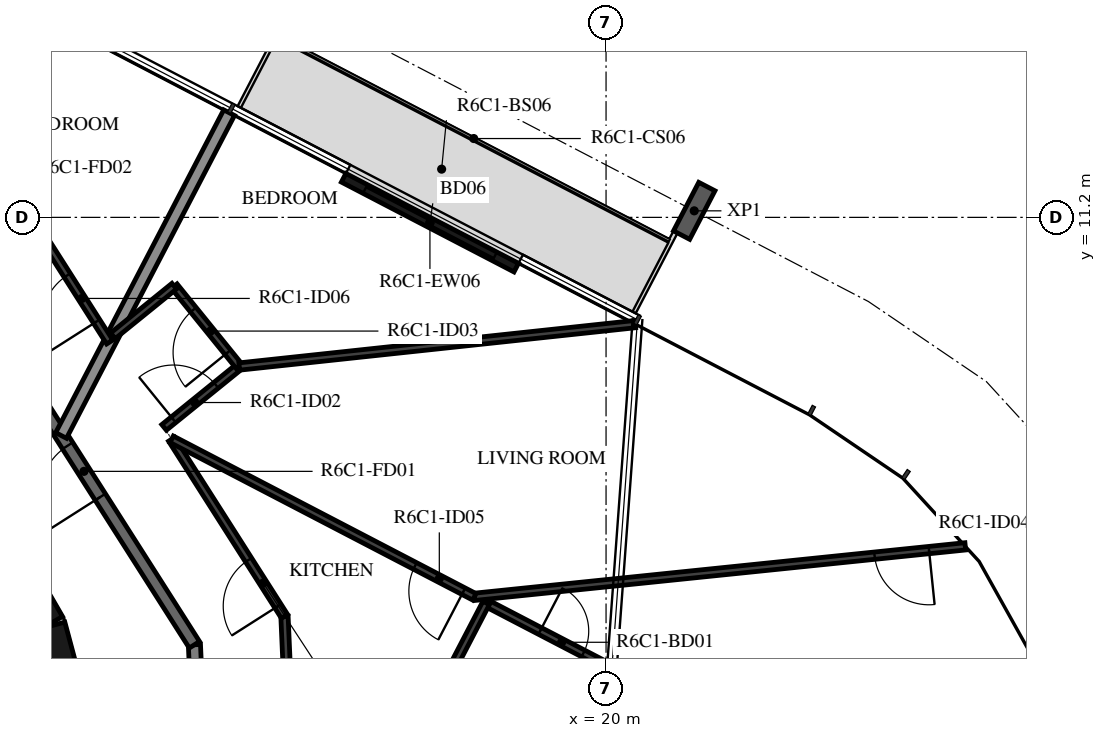
"""IFC4 building model, lengths in metres.
Left out: names, types, materials, properties, quantities, classifications, styles, units other than length and angle.
Written with IfcOpenShell. Run it as: python <this file> out.ifc"""

import sys

from ifc_helpers import new_model, si_unit, direction, frame, frame_2d, origin, origin_2d, place, context, subcontext, project, spatial, rectangle, i_section, extrude, element, fill, save


model = new_model("IFC4")
c1 = context("Model", 3, precision=1e-05, world=origin(), true_north=direction((0.0, 1.0)))
c2 = subcontext(c1, "Body", "Model", "MODEL_VIEW")
j1 = project(units=[si_unit("LENGTHUNIT", "METRE"), si_unit("PLANEANGLEUNIT", "RADIAN")], contexts=[c1])
p1 = place(None, origin())
s1 = spatial("IfcSite", under=j1, at=p1, CompositionType="ELEMENT")
p2 = place(p1, origin())
s2 = spatial("IfcBuilding", under=s1, at=p2, CompositionType="ELEMENT")
p3 = place(p2, frame((0.0, 0.0, 251.2)))
s3 = spatial("IfcBuildingStorey", under=s2, at=p3, CompositionType="ELEMENT", Elevation=251.2)
p4 = place(p3, frame((21.45, 11.308, -0.38), z_axis=(0.0, 0.0, 1.0), x_axis=(0.887010710334, -0.461748849216, 0.0)))
e1 = element("IfcColumn", 1, at=p4, inside=s3, PredefinedType="COLUMN", context=c2, shape_type="SweptSolid", body=[
    extrude(i_section(OverallWidth=0.3, OverallDepth=0.9, WebThickness=0.019, FlangeThickness=0.035, FilletRadius=0.03, at=origin_2d()), origin(), (0.0, 0.0, 1.0), 3.5),
])
p5 = place(p3, frame((18.523, 10.374, 0.0), z_axis=(0.0, 0.0, 1.0), x_axis=(-0.887014349583, 0.461741858221, 0.0)))
e2 = element("IfcWall", 2, at=p5, inside=s3, PredefinedType="STANDARD", context=c2, shape_type="SweptSolid", body=[
    extrude(rectangle(XDim=3.2, YDim=0.16, at=frame_2d((1.6, 0.0))), origin(), (0.0, 0.0, 1.0), 3.12),
])
p6 = place(p5, frame((0.4, 0.0, 0.0)))
e3 = element("IfcOpeningElement", 3, at=p6, cuts=e2, PredefinedType="OPENING", context=c2, shape_type="SweptSolid", body=[
    extrude(rectangle(XDim=2.4, YDim=2.4, at=frame_2d((1.2, 1.2))), frame((0.0, 0.09, 0.0), z_axis=(0.0, -1.0, 0.0), x_axis=(1.0, 0.0, 0.0)), (0.0, 0.0, 1.0), 0.18),
])
for number, where, z_axis, x_axis in (
    (4, (11.643, 1.55, 0.0), (0.0, 0.0, 1.0), (-0.259, 0.966, 0.0)),
    (5, (10.845, 4.51, 0.0), (0.0, 0.0, 1.0), (-0.5, 0.866, 0.0)),
):
    element("IfcWall", number, at=place(p3, frame(where, z_axis=z_axis, x_axis=x_axis)), inside=s3, PredefinedType="SHEAR", context=c2, shape_type="SweptSolid", body=[
        extrude(rectangle(XDim=3.033, YDim=0.5, at=frame_2d((1.516, 0.0))), origin(), (0.0, 0.0, 1.0), 3.12),
    ])
p7 = place(p3, frame((13.331, 1.874, 0.0), z_axis=(0.0, 0.0, 1.0), x_axis=(-0.043621457762, 0.999048131184, 0.0)))
e6 = element("IfcWall", 6, at=p7, inside=s3, PredefinedType="STANDARD", context=c2, shape_type="SweptSolid", body=[
    extrude(rectangle(XDim=2.3, YDim=0.2, at=frame_2d((1.15, 0.0))), origin(), (0.0, 0.0, 1.0), 3.12),
])
p8 = place(p3, frame((13.231, 4.172, 0.0), z_axis=(0.0, 0.0, 1.0), x_axis=(-0.537304397561, 0.843388394728, 0.0)))
e7 = element("IfcWall", 7, at=p8, inside=s3, PredefinedType="STANDARD", context=c2, shape_type="SweptSolid", body=[
    extrude(rectangle(XDim=7.181, YDim=0.2, at=frame_2d((3.59, 0.0))), origin(), (0.0, 0.0, 1.0), 3.12),
])
p9 = place(p8, frame((2.881, 0.0, 0.0)))
e8 = element("IfcOpeningElement", 8, at=p9, cuts=e7, PredefinedType="OPENING", context=c2, shape_type="SweptSolid", body=[
    extrude(rectangle(XDim=1.0, YDim=2.1, at=frame_2d((0.5, 1.05))), frame((0.0, 0.11, 0.0), z_axis=(0.0, -1.0, 0.0), x_axis=(1.0, 0.0, 0.0)), (0.0, 0.0, 1.0), 0.22),
])
p10 = place(p8, frame((5.681, 0.0, 0.0)))
e9 = element("IfcOpeningElement", 9, at=p10, cuts=e7, PredefinedType="OPENING", context=c2, shape_type="SweptSolid", body=[
    extrude(rectangle(XDim=1.0, YDim=2.1, at=frame_2d((0.5, 1.05))), frame((0.0, 0.11, 0.0), z_axis=(0.0, -1.0, 0.0), x_axis=(1.0, 0.0, 0.0)), (0.0, 0.0, 1.0), 0.22),
])
p11 = place(p3, frame((13.801, 12.922, 0.0), z_axis=(0.0, 0.0, 1.0), x_axis=(-0.461726485624, -0.887022351733, 0.0)))
e10 = element("IfcWall", 10, at=p11, inside=s3, PredefinedType="STANDARD", context=c2, shape_type="SweptSolid", body=[
    extrude(rectangle(XDim=5.984, YDim=0.2, at=frame_2d((2.992, 0.0))), origin(), (0.0, 0.0, 1.0), 2.73),
])
p12 = place(p3, frame((14.761, 3.5, 0.0), z_axis=(0.0, 0.0, 1.0), x_axis=(-0.04369750018, 0.999044808043, 0.0)))
e11 = element("IfcWall", 11, at=p12, inside=s3, PredefinedType="PARTITIONING", context=c2, shape_type="SweptSolid", body=[
    extrude(rectangle(XDim=1.14, YDim=0.12, at=frame_2d((0.57, 0.0))), origin(), (0.0, 0.0, 1.0), 3.12),
])
p13 = place(p3, frame((14.712, 4.639, 0.0), z_axis=(0.0, 0.0, 1.0), x_axis=(-0.537287126609, 0.843399397427, 0.0)))
e12 = element("IfcWall", 12, at=p13, inside=s3, PredefinedType="PARTITIONING", context=c2, shape_type="SweptSolid", body=[
    extrude(rectangle(XDim=3.453, YDim=0.12, at=frame_2d((1.727, 0.0))), origin(), (0.0, 0.0, 1.0), 3.12),
])
p14 = place(p13, frame((0.2, 0.0, 0.0)))
e13 = element("IfcOpeningElement", 13, at=p14, cuts=e12, PredefinedType="OPENING", context=c2, shape_type="SweptSolid", body=[
    extrude(rectangle(XDim=0.9, YDim=2.1, at=frame_2d((0.45, 1.05))), frame((0.0, 0.07, 0.0), z_axis=(0.0, -1.0, 0.0), x_axis=(1.0, 0.0, 0.0)), (0.0, 0.0, 1.0), 0.14),
])
p15 = place(p3, frame((12.732, 7.746, 0.0), z_axis=(0.0, 0.0, 1.0), x_axis=(0.777187694298, 0.62926885179, 0.0)))
e14 = element("IfcWall", 14, at=p15, inside=s3, PredefinedType="PARTITIONING", context=c2, shape_type="SweptSolid", body=[
    extrude(rectangle(XDim=1.591, YDim=0.12, at=frame_2d((0.795, 0.0))), origin(), (0.0, 0.0, 1.0), 3.12),
])
p16 = place(p15, frame((0.2, 0.0, 0.0)))
e15 = element("IfcOpeningElement", 15, at=p16, cuts=e14, PredefinedType="OPENING", context=c2, shape_type="SweptSolid", body=[
    extrude(rectangle(XDim=0.9, YDim=2.1, at=frame_2d((0.45, 1.05))), frame((0.0, 0.07, 0.0), z_axis=(0.0, -1.0, 0.0), x_axis=(1.0, 0.0, 0.0)), (0.0, 0.0, 1.0), 0.14),
])
p17 = place(p3, frame((13.969, 8.747, 0.0), z_axis=(0.0, 0.0, 1.0), x_axis=(-0.629359312443, 0.777114441921, 0.0)))
e16 = element("IfcWall", 16, at=p17, inside=s3, PredefinedType="PARTITIONING", context=c2, shape_type="SweptSolid", body=[
    extrude(rectangle(XDim=1.7, YDim=0.12, at=frame_2d((0.85, 0.0))), origin(), (0.0, 0.0, 1.0), 3.12),
])
p18 = place(p17, frame((0.3, 0.0, 0.0)))
e17 = element("IfcOpeningElement", 17, at=p18, cuts=e16, PredefinedType="OPENING", context=c2, shape_type="SweptSolid", body=[
    extrude(rectangle(XDim=0.9, YDim=2.1, at=frame_2d((0.45, 1.05))), frame((0.0, 0.07, 0.0), z_axis=(0.0, -1.0, 0.0), x_axis=(1.0, 0.0, 0.0)), (0.0, 0.0, 1.0), 0.14),
])
p19 = place(p3, frame((12.898, 10.069, 0.0), z_axis=(0.0, 0.0, 1.0), x_axis=(-0.777069405334, -0.629414918232, 0.0)))
e18 = element("IfcWall", 18, at=p19, inside=s3, PredefinedType="PARTITIONING", context=c2, shape_type="SweptSolid", body=[
    extrude(rectangle(XDim=1.296, YDim=0.12, at=frame_2d((0.648, 0.0))), origin(), (0.0, 0.0, 1.0), 3.12),
])
p20 = place(p3, frame((18.028, 4.859, 0.0), z_axis=(0.0, 0.0, 1.0), x_axis=(0.88702512027, -0.46172116695, 0.0)))
e19 = element("IfcWall", 19, at=p20, inside=s3, PredefinedType="PARTITIONING", context=c2, shape_type="SweptSolid", body=[
    extrude(rectangle(XDim=2.983, YDim=0.12, at=frame_2d((1.492, 0.0))), origin(), (0.0, 0.0, 1.0), 3.12),
])
p21 = place(p20, frame((1.0, 0.0, 0.0)))
e20 = element("IfcOpeningElement", 20, at=p21, cuts=e19, PredefinedType="OPENING", context=c2, shape_type="SweptSolid", body=[
    extrude(rectangle(XDim=0.8, YDim=2.1, at=frame_2d((0.4, 1.05))), frame((0.0, 0.07, 0.0), z_axis=(0.0, -1.0, 0.0), x_axis=(1.0, 0.0, 0.0)), (0.0, 0.0, 1.0), 0.14),
])
p22 = place(p3, frame((25.908, 5.79, 0.0), z_axis=(0.0, 0.0, 1.0), x_axis=(-0.994752982456, -0.102305932847, 0.0)))
e21 = element("IfcWall", 21, at=p22, inside=s3, PredefinedType="PARTITIONING", context=c2, shape_type="SweptSolid", body=[
    extrude(rectangle(XDim=8.116, YDim=0.12, at=frame_2d((4.058, 0.0))), origin(), (0.0, 0.0, 1.0), 3.12),
])
p23 = place(p22, frame((0.6, 0.0, 0.0)))
e22 = element("IfcOpeningElement", 22, at=p23, cuts=e21, PredefinedType="OPENING", context=c2, shape_type="SweptSolid", body=[
    extrude(rectangle(XDim=0.9, YDim=2.1, at=frame_2d((0.45, 1.05))), frame((0.0, 0.07, 0.0), z_axis=(0.0, -1.0, 0.0), x_axis=(1.0, 0.0, 0.0)), (0.0, 0.0, 1.0), 0.14),
])
p24 = place(p3, frame((18.028, 4.859, 0.0), z_axis=(0.0, 0.0, 1.0), x_axis=(-0.461688901614, -0.887041914526, 0.0)))
e23 = element("IfcWall", 23, at=p24, inside=s3, PredefinedType="PARTITIONING", context=c2, shape_type="SweptSolid", body=[
    extrude(rectangle(XDim=1.532, YDim=0.12, at=frame_2d((0.766, 0.0))), origin(), (0.0, 0.0, 1.0), 3.12),
])
p25 = place(p3, frame((17.834, 4.96, 0.0), z_axis=(0.0, 0.0, 1.0), x_axis=(-0.887008743782, 0.461752626906, 0.0)))
e24 = element("IfcWall", 24, at=p25, inside=s3, PredefinedType="PARTITIONING", context=c2, shape_type="SweptSolid", body=[
    extrude(rectangle(XDim=5.612, YDim=0.12, at=frame_2d((2.806, 0.0))), origin(), (0.0, 0.0, 1.0), 3.12),
])
p26 = place(p25, frame((0.2, 0.0, 0.0)))
e25 = element("IfcOpeningElement", 25, at=p26, cuts=e24, PredefinedType="OPENING", context=c2, shape_type="SweptSolid", body=[
    extrude(rectangle(XDim=0.9, YDim=2.1, at=frame_2d((0.45, 1.05))), frame((0.0, 0.07, 0.0), z_axis=(0.0, -1.0, 0.0), x_axis=(1.0, 0.0, 0.0)), (0.0, 0.0, 1.0), 0.14),
])
p27 = place(p3, frame((20.48, 9.445, 0.0), z_axis=(0.0, 0.0, 1.0), x_axis=(-0.994311974195, -0.106506797776, 0.0)))
e26 = element("IfcWall", 26, at=p27, inside=s3, PredefinedType="PARTITIONING", context=c2, shape_type="SweptSolid", body=[
    extrude(rectangle(XDim=6.549, YDim=0.12, at=frame_2d((3.274, 0.0))), origin(), (0.0, 0.0, 1.0), 3.12),
])
p28 = place(p3, frame((11.838, 9.15, 0.0), z_axis=(0.0, 0.0, 1.0), x_axis=(-0.537288949014, 0.843398236462, 0.0)))
e27 = element("IfcWall", 27, at=p28, inside=s3, PredefinedType="PARTITIONING", context=c2, shape_type="SweptSolid", body=[
    extrude(rectangle(XDim=2.636, YDim=0.12, at=frame_2d((1.318, 0.0))), origin(), (0.0, 0.0, 1.0), 3.12),
])
p29 = place(p28, frame((0.4, 0.0, 0.0)))
e28 = element("IfcOpeningElement", 28, at=p29, cuts=e27, PredefinedType="OPENING", context=c2, shape_type="SweptSolid", body=[
    extrude(rectangle(XDim=0.9, YDim=2.1, at=frame_2d((0.45, 1.05))), frame((0.0, 0.07, 0.0), z_axis=(0.0, -1.0, 0.0), x_axis=(1.0, 0.0, 0.0)), (0.0, 0.0, 1.0), 0.14),
])
p30 = place(p6, origin())
e29 = element("IfcDoor", 29, at=p30, inside=s3, OperationType="DOUBLE_DOOR_SLIDING", PredefinedType="DOOR", context=c2, shape_type="SweptSolid", body=[
    extrude(rectangle(XDim=2.4, YDim=2.4, at=frame_2d((1.2, 1.2))), frame((0.0, 0.025, 0.0), z_axis=(0.0, -1.0, 0.0), x_axis=(1.0, 0.0, 0.0)), (0.0, 0.0, 1.0), 0.05),
])
fill(e3, e29)
p31 = place(p9, origin())
e30 = element("IfcDoor", 30, at=p31, inside=s3, OperationType="SINGLE_SWING_LEFT", PredefinedType="DOOR", context=c2, shape_type="SweptSolid", body=[
    extrude(rectangle(XDim=1.0, YDim=2.1, at=frame_2d((0.5, 1.05))), frame((0.0, 0.025, 0.0), z_axis=(0.0, -1.0, 0.0), x_axis=(1.0, 0.0, 0.0)), (0.0, 0.0, 1.0), 0.05),
])
fill(e8, e30)
p32 = place(p14, origin())
e31 = element("IfcDoor", 31, at=p32, inside=s3, OperationType="SINGLE_SWING_LEFT", PredefinedType="DOOR", context=c2, shape_type="SweptSolid", body=[
    extrude(rectangle(XDim=0.9, YDim=2.1, at=frame_2d((0.45, 1.05))), frame((0.0, 0.025, 0.0), z_axis=(0.0, -1.0, 0.0), x_axis=(1.0, 0.0, 0.0)), (0.0, 0.0, 1.0), 0.05),
])
fill(e13, e31)
p33 = place(p16, origin())
e32 = element("IfcDoor", 32, at=p33, inside=s3, OperationType="SINGLE_SWING_RIGHT", PredefinedType="DOOR", context=c2, shape_type="SweptSolid", body=[
    extrude(rectangle(XDim=0.9, YDim=2.1, at=frame_2d((0.45, 1.05))), frame((0.0, 0.025, 0.0), z_axis=(0.0, -1.0, 0.0), x_axis=(1.0, 0.0, 0.0)), (0.0, 0.0, 1.0), 0.05),
])
fill(e15, e32)
p34 = place(p18, origin())
e33 = element("IfcDoor", 33, at=p34, inside=s3, OperationType="SINGLE_SWING_LEFT", PredefinedType="DOOR", context=c2, shape_type="SweptSolid", body=[
    extrude(rectangle(XDim=0.9, YDim=2.1, at=frame_2d((0.45, 1.05))), frame((0.0, 0.025, 0.0), z_axis=(0.0, -1.0, 0.0), x_axis=(1.0, 0.0, 0.0)), (0.0, 0.0, 1.0), 0.05),
])
fill(e17, e33)
p35 = place(p23, origin())
e34 = element("IfcDoor", 34, at=p35, inside=s3, OperationType="SINGLE_SWING_LEFT", PredefinedType="DOOR", context=c2, shape_type="SweptSolid", body=[
    extrude(rectangle(XDim=0.9, YDim=2.1, at=frame_2d((0.45, 1.05))), frame((0.0, 0.025, 0.0), z_axis=(0.0, -1.0, 0.0), x_axis=(1.0, 0.0, 0.0)), (0.0, 0.0, 1.0), 0.05),
])
fill(e22, e34)
p36 = place(p21, origin())
e35 = element("IfcDoor", 35, at=p36, inside=s3, OperationType="SINGLE_SWING_RIGHT", PredefinedType="DOOR", context=c2, shape_type="SweptSolid", body=[
    extrude(rectangle(XDim=0.8, YDim=2.1, at=frame_2d((0.4, 1.05))), frame((0.0, 0.025, 0.0), z_axis=(0.0, -1.0, 0.0), x_axis=(1.0, 0.0, 0.0)), (0.0, 0.0, 1.0), 0.05),
])
fill(e20, e35)
p37 = place(p26, origin())
e36 = element("IfcDoor", 36, at=p37, inside=s3, OperationType="SINGLE_SWING_RIGHT", PredefinedType="DOOR", context=c2, shape_type="SweptSolid", body=[
    extrude(rectangle(XDim=0.9, YDim=2.1, at=frame_2d((0.45, 1.05))), frame((0.0, 0.025, 0.0), z_axis=(0.0, -1.0, 0.0), x_axis=(1.0, 0.0, 0.0)), (0.0, 0.0, 1.0), 0.05),
])
fill(e25, e36)
p38 = place(p29, origin())
e37 = element("IfcDoor", 37, at=p38, inside=s3, OperationType="SINGLE_SWING_LEFT", PredefinedType="DOOR", context=c2, shape_type="SweptSolid", body=[
    extrude(rectangle(XDim=0.9, YDim=2.1, at=frame_2d((0.45, 1.05))), frame((0.0, 0.025, 0.0), z_axis=(0.0, -1.0, 0.0), x_axis=(1.0, 0.0, 0.0)), (0.0, 0.0, 1.0), 0.05),
])
fill(e28, e37)
save(model, sys.argv[1])
